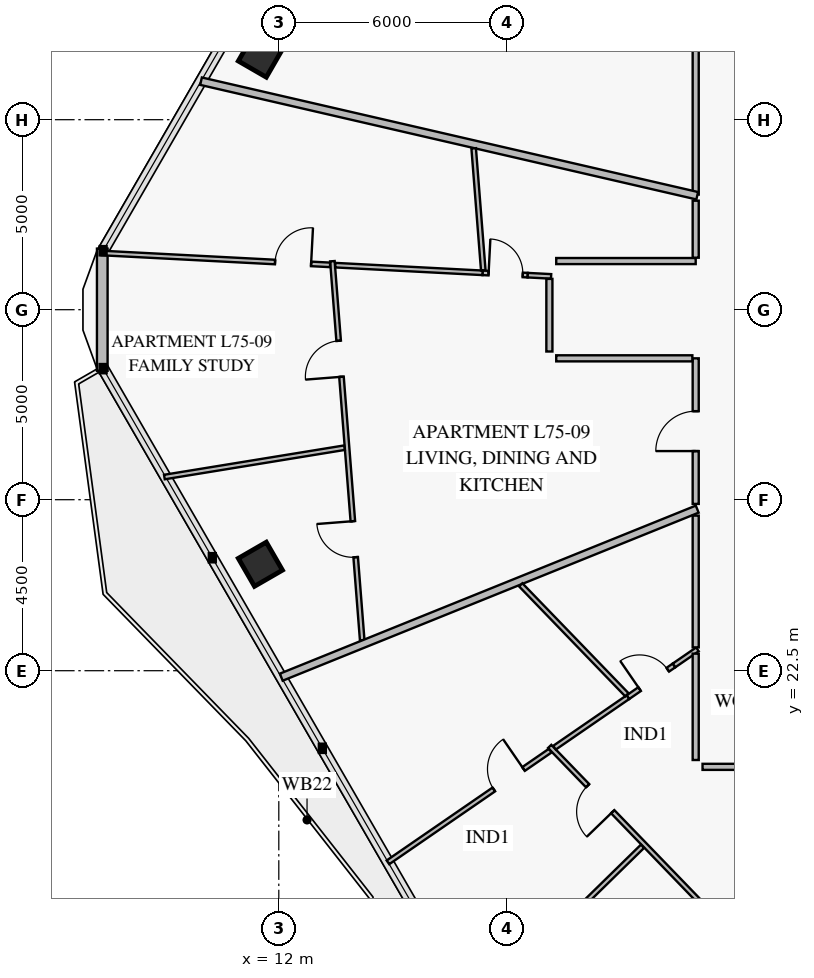
"""IFC4 building model, lengths in metres.
Left out: names, types, materials, properties, quantities, classifications, styles, units other than length and angle.
Written with IfcOpenShell. Run it as: python <this file> out.ifc"""

import sys

from ifc_helpers import new_model, si_unit, direction, frame, frame_2d, origin, origin_2d, place, context, subcontext, project, spatial, rectangle, extrude, element, fill, save


model = new_model("IFC4")
c1 = context("Model", 3, precision=1e-05, world=origin(), true_north=direction((0.0, 1.0)))
c2 = subcontext(c1, "Body", "Model", "MODEL_VIEW")
j1 = project(units=[si_unit("LENGTHUNIT", "METRE"), si_unit("PLANEANGLEUNIT", "RADIAN")], contexts=[c1])
p1 = place(None, origin())
s1 = spatial("IfcSite", under=j1, at=p1, CompositionType="ELEMENT")
p2 = place(p1, origin())
s2 = spatial("IfcBuilding", under=s1, at=p2, CompositionType="ELEMENT")
p3 = place(p2, frame((0.0, 0.0, 295.8)))
s3 = spatial("IfcBuildingStorey", under=s2, at=p3, CompositionType="ELEMENT", Elevation=295.8)
for number, where, z_axis, x_axis in (
    (1, (11.515, 38.699, 0.0), (0.0, 0.0, 1.0), (-0.5, -0.866, 0.0)),
    (2, (11.515, 25.301, 0.0), (0.0, 0.0, 1.0), (0.5, -0.866, 0.0)),
):
    element("IfcColumn", number, at=place(p3, frame(where, z_axis=z_axis, x_axis=x_axis)), inside=s3, PredefinedType="COLUMN", context=c2, shape_type="SweptSolid", body=[
        extrude(rectangle(XDim=0.85, YDim=0.85, at=origin_2d()), origin(), (0.0, 0.0, 1.0), 3.55),
    ])
p4 = place(p3, frame((7.355, 30.393, 0.0), z_axis=(0.0, 0.0, 1.0), x_axis=(0.0, 1.0, 0.0)))
e3 = element("IfcWall", 3, at=p4, inside=s3, PredefinedType="SOLIDWALL", context=c2, shape_type="SweptSolid", body=[
    extrude(rectangle(XDim=3.215, YDim=0.28, at=frame_2d((1.607, 0.0))), origin(), (0.0, 0.0, 1.0), 3.55),
])
p5 = place(p3, frame((19.127, 20.508, 0.0), z_axis=(0.0, 0.0, 1.0), x_axis=(0.694661267459, -0.719337002727, 0.0)))
e4 = element("IfcWall", 4, at=p5, inside=s3, PredefinedType="PARTITIONING", context=c2, shape_type="SweptSolid", body=[
    extrude(rectangle(XDim=11.487, YDim=0.12, at=frame_2d((5.743, 0.0))), origin(), (0.0, 0.0, 1.0), 2.95),
])
p6 = place(p5, frame((1.438, 0.0, 0.0)))
e5 = element("IfcOpeningElement", 5, at=p6, cuts=e4, PredefinedType="OPENING", context=c2, shape_type="SweptSolid", body=[
    extrude(rectangle(XDim=0.95, YDim=2.1, at=frame_2d((0.475, 1.05))), frame((0.0, 0.072, 0.0), z_axis=(0.0, -1.0, 0.0), x_axis=(1.0, 0.0, 0.0)), (0.0, 0.0, 1.0), 0.144),
])
p7 = place(p5, frame((6.942, 0.0, 0.0)))
e6 = element("IfcOpeningElement", 6, at=p7, cuts=e4, PredefinedType="OPENING", context=c2, shape_type="SweptSolid", body=[
    extrude(rectangle(XDim=0.95, YDim=2.1, at=frame_2d((0.475, 1.05))), frame((0.0, 0.072, 0.0), z_axis=(0.0, -1.0, 0.0), x_axis=(1.0, 0.0, 0.0)), (0.0, 0.0, 1.0), 0.144),
])
p8 = place(p3, frame((22.4, 22.639, 0.0), z_axis=(0.0, 0.0, 1.0), x_axis=(-0.82372765271, -0.566985673683, 0.0)))
e7 = element("IfcWall", 7, at=p8, inside=s3, PredefinedType="PARTITIONING", context=c2, shape_type="SweptSolid", body=[
    extrude(rectangle(XDim=1.474, YDim=0.12, at=frame_2d((0.737, 0.0))), origin(), (0.0, 0.0, 1.0), 3.55),
])
p9 = place(p8, frame((0.2, 0.0, 0.0)))
e8 = element("IfcOpeningElement", 8, at=p9, cuts=e7, PredefinedType="OPENING", context=c2, shape_type="SweptSolid", body=[
    extrude(rectangle(XDim=0.9, YDim=2.1, at=frame_2d((0.45, 1.05))), frame((0.0, 0.072, 0.0), z_axis=(0.0, -1.0, 0.0), x_axis=(1.0, 0.0, 0.0)), (0.0, 0.0, 1.0), 0.144),
])
p10 = place(p3, frame((21.186, 21.803, 0.0), z_axis=(0.0, 0.0, 1.0), x_axis=(-0.823756191061, -0.566944210384, 0.0)))
e9 = element("IfcWall", 9, at=p10, inside=s3, PredefinedType="PARTITIONING", context=c2, shape_type="SweptSolid", body=[
    extrude(rectangle(XDim=2.344, YDim=0.12, at=frame_2d((1.172, 0.0))), origin(), (0.0, 0.0, 1.0), 3.15),
])
p11 = place(p3, frame((19.141, 20.396, 0.0), z_axis=(0.0, 0.0, 1.0), x_axis=(-0.823725661839, -0.566988566047, 0.0)))
e10 = element("IfcWall", 10, at=p11, inside=s3, PredefinedType="PARTITIONING", context=c2, shape_type="SweptSolid", body=[
    extrude(rectangle(XDim=5.183, YDim=0.12, at=frame_2d((2.591, 0.0))), origin(), (0.0, 0.0, 1.0), 2.93),
])
p12 = place(p11, frame((0.85, 0.0, 0.0)))
e11 = element("IfcOpeningElement", 11, at=p12, cuts=e10, PredefinedType="OPENING", context=c2, shape_type="SweptSolid", body=[
    extrude(rectangle(XDim=0.95, YDim=2.1, at=frame_2d((0.475, 1.05))), frame((0.0, 0.072, 0.0), z_axis=(0.0, -1.0, 0.0), x_axis=(1.0, 0.0, 0.0)), (0.0, 0.0, 1.0), 0.144),
])
p13 = place(p3, frame((23.15, 19.97, 0.0), z_axis=(0.0, 0.0, 1.0), x_axis=(1.0, 0.0, 0.0)))
e12 = element("IfcWall", 12, at=p13, inside=s3, PredefinedType="PARTITIONING", context=c2, shape_type="SweptSolid", body=[
    extrude(rectangle(XDim=7.346, YDim=0.16, at=frame_2d((3.673, 0.0))), origin(), (0.0, 0.0, 1.0), 2.95),
])
p14 = place(p13, frame((3.148, 0.0, 0.0)))
e13 = element("IfcOpeningElement", 13, at=p14, cuts=e12, PredefinedType="OPENING", context=c2, shape_type="SweptSolid", body=[
    extrude(rectangle(XDim=1.05, YDim=2.15, at=frame_2d((0.525, 1.075))), frame((0.0, 0.092, 0.0), z_axis=(0.0, -1.0, 0.0), x_axis=(1.0, 0.0, 0.0)), (0.0, 0.0, 1.0), 0.184),
])
p15 = place(p3, frame((22.97, 43.85, 0.0), z_axis=(0.0, 0.0, 1.0), x_axis=(0.0, -1.0, 0.0)))
e14 = element("IfcWall", 14, at=p15, inside=s3, PredefinedType="PARTITIONING", context=c2, shape_type="SweptSolid", body=[
    extrude(rectangle(XDim=8.821, YDim=0.16, at=frame_2d((4.411, 0.0))), origin(), (0.0, 0.0, 1.0), 2.95),
])
p16 = place(p15, frame((3.836, 0.0, 0.0)))
e15 = element("IfcOpeningElement", 15, at=p16, cuts=e14, PredefinedType="OPENING", context=c2, shape_type="SweptSolid", body=[
    extrude(rectangle(XDim=1.15, YDim=2.2, at=frame_2d((0.575, 1.1))), frame((0.0, 0.092, 0.0), z_axis=(0.0, -1.0, 0.0), x_axis=(1.0, 0.0, 0.0)), (0.0, 0.0, 1.0), 0.184),
])
p17 = place(p3, frame((13.41, 33.276, 0.0), z_axis=(0.0, 0.0, 1.0), x_axis=(0.078461860228, -0.996917116158, 0.0)))
e16 = element("IfcWall", 16, at=p17, inside=s3, PredefinedType="PARTITIONING", context=c2, shape_type="SweptSolid", body=[
    extrude(rectangle(XDim=10.004, YDim=0.12, at=frame_2d((5.002, 0.0))), origin(), (0.0, 0.0, 1.0), 2.95),
])
p18 = place(p17, frame((2.101, 0.0, 0.0)))
e17 = element("IfcOpeningElement", 17, at=p18, cuts=e16, PredefinedType="OPENING", context=c2, shape_type="SweptSolid", body=[
    extrude(rectangle(XDim=0.95, YDim=2.1, at=frame_2d((0.475, 1.05))), frame((0.0, 0.072, 0.0), z_axis=(0.0, -1.0, 0.0), x_axis=(1.0, 0.0, 0.0)), (0.0, 0.0, 1.0), 0.144),
])
p19 = place(p17, frame((6.863, 0.0, 0.0)))
e18 = element("IfcOpeningElement", 18, at=p19, cuts=e16, PredefinedType="OPENING", context=c2, shape_type="SweptSolid", body=[
    extrude(rectangle(XDim=0.95, YDim=2.1, at=frame_2d((0.475, 1.05))), frame((0.0, 0.072, 0.0), z_axis=(0.0, -1.0, 0.0), x_axis=(1.0, 0.0, 0.0)), (0.0, 0.0, 1.0), 0.144),
])
p20 = place(p3, frame((18.55, 32.908, 0.0), z_axis=(0.0, 0.0, 1.0), x_axis=(-0.998654389981, 0.051859515736, 0.0)))
e19 = element("IfcWall", 19, at=p20, inside=s3, PredefinedType="PARTITIONING", context=c2, shape_type="SweptSolid", body=[
    extrude(rectangle(XDim=1.191, YDim=0.12, at=frame_2d((0.596, 0.0))), origin(), (0.0, 0.0, 1.0), 3.55),
])
p21 = place(p20, frame((0.131, 0.0, 0.0)))
e20 = element("IfcOpeningElement", 20, at=p21, cuts=e19, PredefinedType="OPENING", context=c2, shape_type="SweptSolid", body=[
    extrude(rectangle(XDim=0.9, YDim=2.1, at=frame_2d((0.45, 1.05))), frame((0.0, 0.072, 0.0), z_axis=(0.0, -1.0, 0.0), x_axis=(1.0, 0.0, 0.0)), (0.0, 0.0, 1.0), 0.144),
])
p22 = place(p3, frame((17.361, 32.97, 0.0), z_axis=(0.0, 0.0, 1.0), x_axis=(-0.99864481564, 0.05204356056, 0.0)))
e21 = element("IfcWall", 21, at=p22, inside=s3, PredefinedType="PARTITIONING", context=c2, shape_type="SweptSolid", body=[
    extrude(rectangle(XDim=3.88, YDim=0.12, at=frame_2d((1.94, 0.0))), origin(), (0.0, 0.0, 1.0), 3.55),
])
p23 = place(p3, frame((13.349, 33.179, 0.0), z_axis=(0.0, 0.0, 1.0), x_axis=(-0.998648369581, 0.051975320417, 0.0)))
e22 = element("IfcWall", 22, at=p23, inside=s3, PredefinedType="PARTITIONING", context=c2, shape_type="SweptSolid", body=[
    extrude(rectangle(XDim=6.017, YDim=0.12, at=frame_2d((3.009, 0.0))), origin(), (0.0, 0.0, 1.0), 2.93),
])
p24 = place(p23, frame((0.5, 0.0, 0.0)))
e23 = element("IfcOpeningElement", 23, at=p24, cuts=e22, PredefinedType="OPENING", context=c2, shape_type="SweptSolid", body=[
    extrude(rectangle(XDim=0.95, YDim=2.1, at=frame_2d((0.475, 1.05))), frame((0.0, 0.072, 0.0), z_axis=(0.0, -1.0, 0.0), x_axis=(1.0, 0.0, 0.0)), (0.0, 0.0, 1.0), 0.144),
])
p25 = place(p3, frame((22.97, 30.72, 0.0), z_axis=(0.0, 0.0, 1.0), x_axis=(0.0, -1.0, 0.0)))
e24 = element("IfcWall", 24, at=p25, inside=s3, PredefinedType="PARTITIONING", context=c2, shape_type="SweptSolid", body=[
    extrude(rectangle(XDim=3.831, YDim=0.16, at=frame_2d((1.916, 0.0))), origin(), (0.0, 0.0, 1.0), 2.95),
])
p26 = place(p25, frame((1.391, 0.0, 0.0)))
e25 = element("IfcOpeningElement", 25, at=p26, cuts=e24, PredefinedType="OPENING", context=c2, shape_type="SweptSolid", body=[
    extrude(rectangle(XDim=1.05, YDim=2.15, at=frame_2d((0.525, 1.075))), frame((0.0, 0.092, 0.0), z_axis=(0.0, -1.0, 0.0), x_axis=(1.0, 0.0, 0.0)), (0.0, 0.0, 1.0), 0.184),
])
p27 = place(p3, frame((23.01, 26.752, 0.0), z_axis=(0.0, 0.0, 1.0), x_axis=(-0.927183134291, -0.374608376155, 0.0)))
e26 = element("IfcWall", 26, at=p27, inside=s3, PredefinedType="PARTITIONING", context=c2, shape_type="SweptSolid", body=[
    extrude(rectangle(XDim=11.805, YDim=0.2, at=frame_2d((5.902, 0.0))), origin(), (0.0, 0.0, 1.0), 2.93),
])
p28 = place(p3, frame((21.571, 17.88, 0.0), z_axis=(0.0, 0.0, 1.0), x_axis=(-0.714721208256, -0.699409461238, 0.0)))
e27 = element("IfcWall", 27, at=p28, inside=s3, PredefinedType="PARTITIONING", context=c2, shape_type="SweptSolid", body=[
    extrude(rectangle(XDim=4.704, YDim=0.12, at=frame_2d((2.352, 0.0))), origin(), (0.0, 0.0, 1.0), 2.95),
])
p29 = place(p3, frame((23.015, 23.062, 0.0), z_axis=(0.0, 0.0, 1.0), x_axis=(-0.823707844143, -0.567014450871, 0.0)))
e28 = element("IfcWall", 28, at=p29, inside=s3, PredefinedType="PARTITIONING", context=c2, shape_type="SweptSolid", body=[
    extrude(rectangle(XDim=0.747, YDim=0.12, at=frame_2d((0.373, 0.0))), origin(), (0.0, 0.0, 1.0), 3.55),
])
p30 = place(p3, frame((18.366, 24.759, 0.0), z_axis=(0.0, 0.0, 1.0), x_axis=(0.694640032454, -0.719357508692, 0.0)))
e29 = element("IfcWall", 29, at=p30, inside=s3, PredefinedType="PARTITIONING", context=c2, shape_type="SweptSolid", body=[
    extrude(rectangle(XDim=4.02, YDim=0.12, at=frame_2d((2.01, 0.0))), origin(), (0.0, 0.0, 1.0), 3.15),
])
p31 = place(p3, frame((23.01, 34.999, 0.0), z_axis=(0.0, 0.0, 1.0), x_axis=(-0.974372460803, 0.224940675799, 0.0)))
e30 = element("IfcWall", 30, at=p31, inside=s3, PredefinedType="PARTITIONING", context=c2, shape_type="SweptSolid", body=[
    extrude(rectangle(XDim=13.4, YDim=0.2, at=frame_2d((6.7, 0.0))), origin(), (0.0, 0.0, 1.0), 2.93),
])
p32 = place(p3, frame((13.728, 28.369, 0.0), z_axis=(0.0, 0.0, 1.0), x_axis=(-0.986970483609, -0.160901412311, 0.0)))
e31 = element("IfcWall", 31, at=p32, inside=s3, PredefinedType="PARTITIONING", context=c2, shape_type="SweptSolid", body=[
    extrude(rectangle(XDim=4.801, YDim=0.12, at=frame_2d((2.4, 0.0))), origin(), (0.0, 0.0, 1.0), 2.93),
])
p33 = place(p3, frame((19.165, 32.876, 0.0), z_axis=(0.0, 0.0, 1.0), x_axis=(-0.998650488965, 0.051934582793, 0.0)))
e32 = element("IfcWall", 32, at=p33, inside=s3, PredefinedType="PARTITIONING", context=c2, shape_type="SweptSolid", body=[
    extrude(rectangle(XDim=0.616, YDim=0.12, at=frame_2d((0.308, 0.0))), origin(), (0.0, 0.0, 1.0), 3.55),
])
p34 = place(p3, frame((17.128, 36.246, 0.0), z_axis=(0.0, 0.0, 1.0), x_axis=(0.078430710839, -0.996919567266, 0.0)))
e33 = element("IfcWall", 33, at=p34, inside=s3, PredefinedType="PARTITIONING", context=c2, shape_type="SweptSolid", body=[
    extrude(rectangle(XDim=3.219, YDim=0.12, at=frame_2d((1.609, 0.0))), origin(), (0.0, 0.0, 1.0), 3.55),
])
p35 = place(p3, frame((22.97, 22.949, 0.0), z_axis=(0.0, 0.0, 1.0), x_axis=(0.0, -1.0, 0.0)))
e34 = element("IfcWall", 34, at=p35, inside=s3, PredefinedType="PARTITIONING", context=c2, shape_type="SweptSolid", body=[
    extrude(rectangle(XDim=2.799, YDim=0.16, at=frame_2d((1.399, 0.0))), origin(), (0.0, 0.0, 1.0), 3.55),
])
p36 = place(p3, frame((22.97, 26.581, 0.0), z_axis=(0.0, 0.0, 1.0), x_axis=(0.0, -1.0, 0.0)))
e35 = element("IfcWall", 35, at=p36, inside=s3, PredefinedType="PARTITIONING", context=c2, shape_type="SweptSolid", body=[
    extrude(rectangle(XDim=3.467, YDim=0.16, at=frame_2d((1.733, 0.0))), origin(), (0.0, 0.0, 1.0), 3.55),
])
p37 = place(p3, frame((19.3, 30.72, 0.0), z_axis=(0.0, 0.0, 1.0), x_axis=(1.0, 0.0, 0.0)))
e36 = element("IfcWall", 36, at=p37, inside=s3, PredefinedType="PARTITIONING", context=c2, shape_type="SweptSolid", body=[
    extrude(rectangle(XDim=3.582, YDim=0.16, at=frame_2d((1.791, 0.0))), origin(), (0.0, 0.0, 1.0), 3.55),
])
p38 = place(p3, frame((19.12, 32.811, 0.0), z_axis=(0.0, 0.0, 1.0), x_axis=(0.0, -1.0, 0.0)))
e37 = element("IfcWall", 37, at=p38, inside=s3, PredefinedType="PARTITIONING", context=c2, shape_type="SweptSolid", body=[
    extrude(rectangle(XDim=1.911, YDim=0.16, at=frame_2d((0.955, 0.0))), origin(), (0.0, 0.0, 1.0), 3.55),
])
p39 = place(p3, frame((22.97, 33.28, 0.0), z_axis=(0.0, 0.0, 1.0), x_axis=(-1.0, 0.0, 0.0)))
e38 = element("IfcWall", 38, at=p39, inside=s3, PredefinedType="PARTITIONING", context=c2, shape_type="SweptSolid", body=[
    extrude(rectangle(XDim=3.67, YDim=0.16, at=frame_2d((1.835, 0.0))), origin(), (0.0, 0.0, 1.0), 3.55),
])
p40 = place(p3, frame((22.97, 34.868, 0.0), z_axis=(0.0, 0.0, 1.0), x_axis=(0.0, -1.0, 0.0)))
e39 = element("IfcWall", 39, at=p40, inside=s3, PredefinedType="PARTITIONING", context=c2, shape_type="SweptSolid", body=[
    extrude(rectangle(XDim=1.5, YDim=0.16, at=frame_2d((0.75, 0.0))), origin(), (0.0, 0.0, 1.0), 3.55),
])
p41 = place(p6, frame((0.95, 0.0, 0.0), z_axis=(0.0, 0.0, 1.0), x_axis=(-1.0, 0.0, 0.0)))
e40 = element("IfcDoor", 40, at=p41, inside=s3, OperationType="SINGLE_SWING_LEFT", PredefinedType="DOOR", context=c2, shape_type="SweptSolid", body=[
    extrude(rectangle(XDim=0.95, YDim=2.1, at=frame_2d((0.475, 1.05))), frame((0.0, 0.025, 0.0), z_axis=(0.0, -1.0, 0.0), x_axis=(1.0, 0.0, 0.0)), (0.0, 0.0, 1.0), 0.05),
])
fill(e5, e40)
p42 = place(p9, frame((0.9, 0.0, 0.0), z_axis=(0.0, 0.0, 1.0), x_axis=(-1.0, 0.0, 0.0)))
e41 = element("IfcDoor", 41, at=p42, inside=s3, OperationType="SINGLE_SWING_LEFT", PredefinedType="DOOR", context=c2, shape_type="SweptSolid", body=[
    extrude(rectangle(XDim=0.9, YDim=2.1, at=frame_2d((0.45, 1.05))), frame((0.0, 0.025, 0.0), z_axis=(0.0, -1.0, 0.0), x_axis=(1.0, 0.0, 0.0)), (0.0, 0.0, 1.0), 0.05),
])
fill(e8, e41)
p43 = place(p12, frame((0.95, 0.0, 0.0), z_axis=(0.0, 0.0, 1.0), x_axis=(-1.0, 0.0, 0.0)))
e42 = element("IfcDoor", 42, at=p43, inside=s3, OperationType="SINGLE_SWING_RIGHT", PredefinedType="DOOR", context=c2, shape_type="SweptSolid", body=[
    extrude(rectangle(XDim=0.95, YDim=2.1, at=frame_2d((0.475, 1.05))), frame((0.0, 0.025, 0.0), z_axis=(0.0, -1.0, 0.0), x_axis=(1.0, 0.0, 0.0)), (0.0, 0.0, 1.0), 0.05),
])
fill(e11, e42)
p44 = place(p18, frame((0.95, 0.0, 0.0), z_axis=(0.0, 0.0, 1.0), x_axis=(-1.0, 0.0, 0.0)))
e43 = element("IfcDoor", 43, at=p44, inside=s3, OperationType="SINGLE_SWING_LEFT", PredefinedType="DOOR", context=c2, shape_type="SweptSolid", body=[
    extrude(rectangle(XDim=0.95, YDim=2.1, at=frame_2d((0.475, 1.05))), frame((0.0, 0.025, 0.0), z_axis=(0.0, -1.0, 0.0), x_axis=(1.0, 0.0, 0.0)), (0.0, 0.0, 1.0), 0.05),
])
fill(e17, e43)
p45 = place(p19, frame((0.95, 0.0, 0.0), z_axis=(0.0, 0.0, 1.0), x_axis=(-1.0, 0.0, 0.0)))
e44 = element("IfcDoor", 44, at=p45, inside=s3, OperationType="SINGLE_SWING_RIGHT", PredefinedType="DOOR", context=c2, shape_type="SweptSolid", body=[
    extrude(rectangle(XDim=0.95, YDim=2.1, at=frame_2d((0.475, 1.05))), frame((0.0, 0.025, 0.0), z_axis=(0.0, -1.0, 0.0), x_axis=(1.0, 0.0, 0.0)), (0.0, 0.0, 1.0), 0.05),
])
fill(e18, e44)
p46 = place(p21, frame((0.9, 0.0, 0.0), z_axis=(0.0, 0.0, 1.0), x_axis=(-1.0, 0.0, 0.0)))
e45 = element("IfcDoor", 45, at=p46, inside=s3, OperationType="SINGLE_SWING_LEFT", PredefinedType="DOOR", context=c2, shape_type="SweptSolid", body=[
    extrude(rectangle(XDim=0.9, YDim=2.1, at=frame_2d((0.45, 1.05))), frame((0.0, 0.025, 0.0), z_axis=(0.0, -1.0, 0.0), x_axis=(1.0, 0.0, 0.0)), (0.0, 0.0, 1.0), 0.05),
])
fill(e20, e45)
p47 = place(p24, frame((0.95, 0.0, 0.0), z_axis=(0.0, 0.0, 1.0), x_axis=(-1.0, 0.0, 0.0)))
e46 = element("IfcDoor", 46, at=p47, inside=s3, OperationType="SINGLE_SWING_RIGHT", PredefinedType="DOOR", context=c2, shape_type="SweptSolid", body=[
    extrude(rectangle(XDim=0.95, YDim=2.1, at=frame_2d((0.475, 1.05))), frame((0.0, 0.025, 0.0), z_axis=(0.0, -1.0, 0.0), x_axis=(1.0, 0.0, 0.0)), (0.0, 0.0, 1.0), 0.05),
])
fill(e23, e46)
p48 = place(p26, frame((1.05, 0.0, 0.0), z_axis=(0.0, 0.0, 1.0), x_axis=(-1.0, 0.0, 0.0)))
e47 = element("IfcDoor", 47, at=p48, inside=s3, OperationType="SINGLE_SWING_LEFT", PredefinedType="DOOR", context=c2, shape_type="SweptSolid", body=[
    extrude(rectangle(XDim=1.05, YDim=2.15, at=frame_2d((0.525, 1.075))), frame((0.0, 0.025, 0.0), z_axis=(0.0, -1.0, 0.0), x_axis=(1.0, 0.0, 0.0)), (0.0, 0.0, 1.0), 0.05),
])
fill(e25, e47)
save(model, sys.argv[1])
